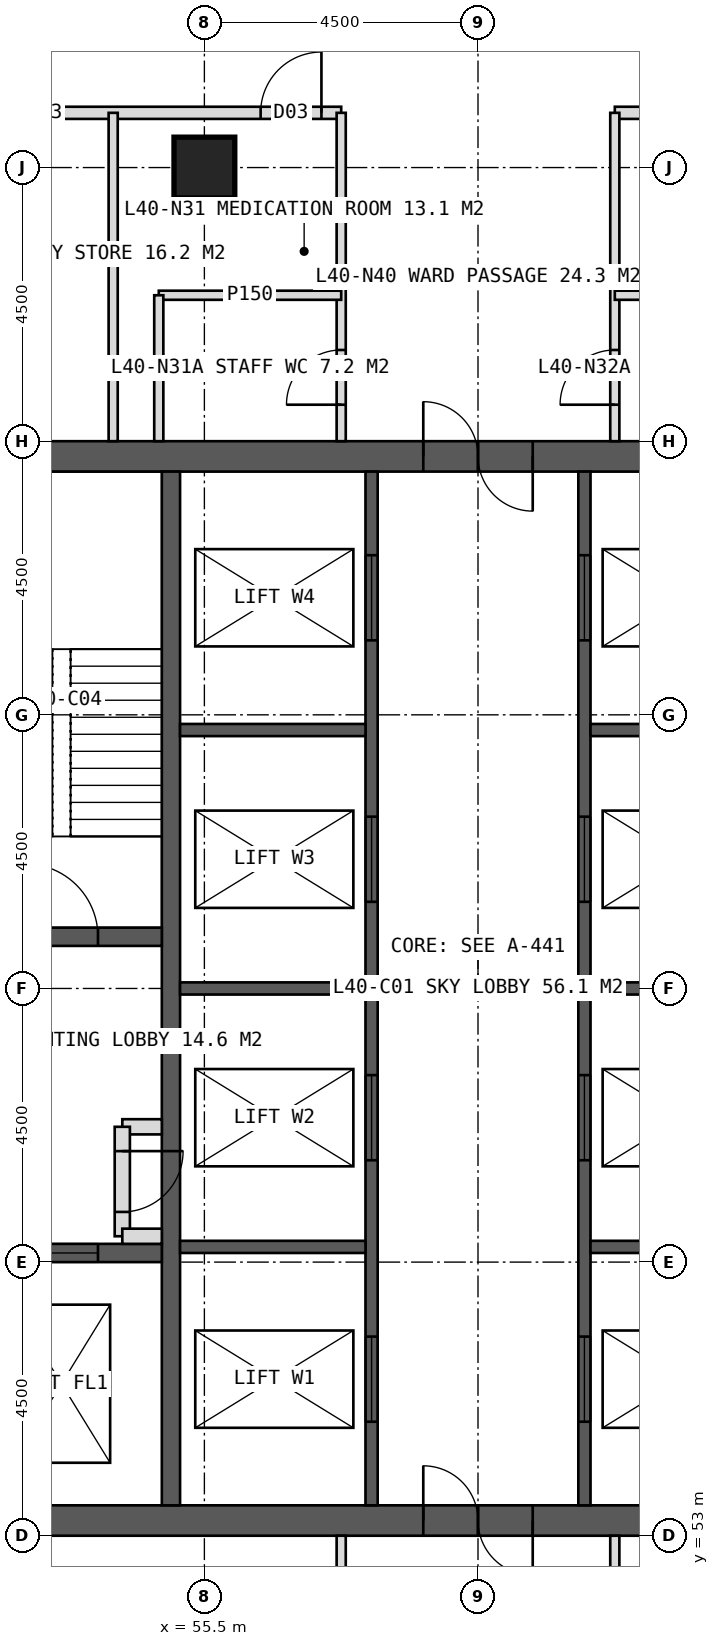
"""IFC4 building model, lengths in metres.
Left out: names, types, materials, properties, quantities, classifications, styles, units other than length and angle.
Written with IfcOpenShell. Run it as: python <this file> out.ifc"""

import sys

from ifc_helpers import new_model, si_unit, direction, frame, frame_2d, origin, origin_2d, place, context, subcontext, project, spatial, rectangle, hollow_rectangle, extrude, element, fill, save


model = new_model("IFC4")
c1 = context("Model", 3, precision=1e-05, world=origin(), true_north=direction((0.0, 1.0)))
c2 = subcontext(c1, "Body", "Model", "MODEL_VIEW")
j1 = project(units=[si_unit("LENGTHUNIT", "METRE"), si_unit("PLANEANGLEUNIT", "RADIAN")], contexts=[c1])
p1 = place(None, origin())
s1 = spatial("IfcSite", under=j1, at=p1, CompositionType="ELEMENT")
p2 = place(p1, origin())
s2 = spatial("IfcBuilding", under=s1, at=p2, CompositionType="ELEMENT")
p3 = place(p2, frame((0.0, 0.0, 168.0)))
s3 = spatial("IfcBuildingStorey", under=s2, at=p3, CompositionType="ELEMENT", Elevation=168.0)
p4 = place(p3, frame((51.0, 70.75, 0.0), z_axis=(0.0, 0.0, 1.0), x_axis=(1.0, 0.0, 0.0)))
e1 = element("IfcWall", 1, at=p4, inside=s3, PredefinedType="SHEAR", context=c2, shape_type="SweptSolid", body=[
    extrude(rectangle(XDim=18.0, YDim=0.5, at=frame_2d((9.0, 0.0))), origin(), (0.0, 0.0, 1.0), 4.0),
])
p5 = place(p4, frame((8.1, 0.0, 0.0)))
e2 = element("IfcOpeningElement", 2, at=p5, cuts=e1, PredefinedType="OPENING", context=c2, shape_type="SweptSolid", body=[
    extrude(rectangle(XDim=1.8, YDim=2.2, at=frame_2d((0.9, 1.1))), frame((0.0, 0.26, 0.0), z_axis=(0.0, -1.0, 0.0), x_axis=(1.0, 0.0, 0.0)), (0.0, 0.0, 1.0), 0.52),
])
p6 = place(p3, frame((51.0, 53.25, 0.0), z_axis=(0.0, 0.0, 1.0), x_axis=(1.0, 0.0, 0.0)))
e3 = element("IfcWall", 3, at=p6, inside=s3, PredefinedType="SHEAR", context=c2, shape_type="SweptSolid", body=[
    extrude(rectangle(XDim=18.0, YDim=0.5, at=frame_2d((9.0, 0.0))), origin(), (0.0, 0.0, 1.0), 4.0),
])
p7 = place(p6, frame((8.1, 0.0, 0.0)))
e4 = element("IfcOpeningElement", 4, at=p7, cuts=e3, PredefinedType="OPENING", context=c2, shape_type="SweptSolid", body=[
    extrude(rectangle(XDim=1.8, YDim=2.2, at=frame_2d((0.9, 1.1))), frame((0.0, 0.26, 0.0), z_axis=(0.0, -1.0, 0.0), x_axis=(1.0, 0.0, 0.0)), (0.0, 0.0, 1.0), 0.52),
])
p8 = place(p3, frame((54.95, 53.5, 0.0), z_axis=(0.0, 0.0, 1.0), x_axis=(0.0, 1.0, 0.0)))
e5 = element("IfcWall", 5, at=p8, inside=s3, PredefinedType="SHEAR", context=c2, shape_type="SweptSolid", body=[
    extrude(rectangle(XDim=17.0, YDim=0.3, at=frame_2d((8.5, 0.0))), origin(), (0.0, 0.0, 1.0), 4.0),
])
p9 = place(p3, frame((58.25, 53.5, 0.0), z_axis=(0.0, 0.0, 1.0), x_axis=(0.0, 1.0, 0.0)))
e6 = element("IfcWall", 6, at=p9, inside=s3, PredefinedType="SHEAR", context=c2, shape_type="SweptSolid", body=[
    extrude(rectangle(XDim=17.0, YDim=0.2, at=frame_2d((8.5, 0.0))), origin(), (0.0, 0.0, 1.0), 4.0),
])
p10 = place(p9, frame((1.375, 0.0, 0.0)))
e7 = element("IfcOpeningElement", 7, at=p10, cuts=e6, PredefinedType="OPENING", context=c2, shape_type="SweptSolid", body=[
    extrude(rectangle(XDim=1.4, YDim=2.2, at=frame_2d((0.7, 1.1))), frame((0.0, 0.11, 0.0), z_axis=(0.0, -1.0, 0.0), x_axis=(1.0, 0.0, 0.0)), (0.0, 0.0, 1.0), 0.22),
])
p11 = place(p9, frame((5.675, 0.0, 0.0)))
e8 = element("IfcOpeningElement", 8, at=p11, cuts=e6, PredefinedType="OPENING", context=c2, shape_type="SweptSolid", body=[
    extrude(rectangle(XDim=1.4, YDim=2.2, at=frame_2d((0.7, 1.1))), frame((0.0, 0.11, 0.0), z_axis=(0.0, -1.0, 0.0), x_axis=(1.0, 0.0, 0.0)), (0.0, 0.0, 1.0), 0.22),
])
p12 = place(p9, frame((9.925, 0.0, 0.0)))
e9 = element("IfcOpeningElement", 9, at=p12, cuts=e6, PredefinedType="OPENING", context=c2, shape_type="SweptSolid", body=[
    extrude(rectangle(XDim=1.4, YDim=2.2, at=frame_2d((0.7, 1.1))), frame((0.0, 0.11, 0.0), z_axis=(0.0, -1.0, 0.0), x_axis=(1.0, 0.0, 0.0)), (0.0, 0.0, 1.0), 0.22),
])
p13 = place(p9, frame((14.225, 0.0, 0.0)))
e10 = element("IfcOpeningElement", 10, at=p13, cuts=e6, PredefinedType="OPENING", context=c2, shape_type="SweptSolid", body=[
    extrude(rectangle(XDim=1.4, YDim=2.2, at=frame_2d((0.7, 1.1))), frame((0.0, 0.11, 0.0), z_axis=(0.0, -1.0, 0.0), x_axis=(1.0, 0.0, 0.0)), (0.0, 0.0, 1.0), 0.22),
])
p14 = place(p3, frame((61.75, 53.5, 0.0), z_axis=(0.0, 0.0, 1.0), x_axis=(0.0, 1.0, 0.0)))
e11 = element("IfcWall", 11, at=p14, inside=s3, PredefinedType="SHEAR", context=c2, shape_type="SweptSolid", body=[
    extrude(rectangle(XDim=17.0, YDim=0.2, at=frame_2d((8.5, 0.0))), origin(), (0.0, 0.0, 1.0), 4.0),
])
p15 = place(p14, frame((1.375, 0.0, 0.0)))
e12 = element("IfcOpeningElement", 12, at=p15, cuts=e11, PredefinedType="OPENING", context=c2, shape_type="SweptSolid", body=[
    extrude(rectangle(XDim=1.4, YDim=2.2, at=frame_2d((0.7, 1.1))), frame((0.0, 0.11, 0.0), z_axis=(0.0, -1.0, 0.0), x_axis=(1.0, 0.0, 0.0)), (0.0, 0.0, 1.0), 0.22),
])
p16 = place(p14, frame((5.675, 0.0, 0.0)))
e13 = element("IfcOpeningElement", 13, at=p16, cuts=e11, PredefinedType="OPENING", context=c2, shape_type="SweptSolid", body=[
    extrude(rectangle(XDim=1.4, YDim=2.2, at=frame_2d((0.7, 1.1))), frame((0.0, 0.11, 0.0), z_axis=(0.0, -1.0, 0.0), x_axis=(1.0, 0.0, 0.0)), (0.0, 0.0, 1.0), 0.22),
])
p17 = place(p14, frame((9.925, 0.0, 0.0)))
e14 = element("IfcOpeningElement", 14, at=p17, cuts=e11, PredefinedType="OPENING", context=c2, shape_type="SweptSolid", body=[
    extrude(rectangle(XDim=1.4, YDim=2.2, at=frame_2d((0.7, 1.1))), frame((0.0, 0.11, 0.0), z_axis=(0.0, -1.0, 0.0), x_axis=(1.0, 0.0, 0.0)), (0.0, 0.0, 1.0), 0.22),
])
p18 = place(p14, frame((14.225, 0.0, 0.0)))
e15 = element("IfcOpeningElement", 15, at=p18, cuts=e11, PredefinedType="OPENING", context=c2, shape_type="SweptSolid", body=[
    extrude(rectangle(XDim=1.4, YDim=2.2, at=frame_2d((0.7, 1.1))), frame((0.0, 0.11, 0.0), z_axis=(0.0, -1.0, 0.0), x_axis=(1.0, 0.0, 0.0)), (0.0, 0.0, 1.0), 0.22),
])
for number, where, z_axis, x_axis in (
    (16, (55.1, 57.75, 0.0), (0.0, 0.0, 1.0), (1.0, 0.0, 0.0)),
    (17, (61.85, 57.75, 0.0), (0.0, 0.0, 1.0), (1.0, 0.0, 0.0)),
    (18, (55.1, 62.0, 0.0), (0.0, 0.0, 1.0), (1.0, 0.0, 0.0)),
    (19, (61.85, 62.0, 0.0), (0.0, 0.0, 1.0), (1.0, 0.0, 0.0)),
    (20, (55.1, 66.25, 0.0), (0.0, 0.0, 1.0), (1.0, 0.0, 0.0)),
    (21, (61.85, 66.25, 0.0), (0.0, 0.0, 1.0), (1.0, 0.0, 0.0)),
):
    element("IfcWall", number, at=place(p3, frame(where, z_axis=z_axis, x_axis=x_axis)), inside=s3, PredefinedType="SHEAR", context=c2, shape_type="SweptSolid", body=[
        extrude(rectangle(XDim=3.05, YDim=0.2, at=frame_2d((1.525, 0.0))), origin(), (0.0, 0.0, 1.0), 4.0),
    ])
p19 = place(p3, frame((51.5, 62.85, 0.0), z_axis=(0.0, 0.0, 1.0), x_axis=(1.0, 0.0, 0.0)))
e22 = element("IfcWall", 22, at=p19, inside=s3, PredefinedType="SHEAR", context=c2, shape_type="SweptSolid", body=[
    extrude(rectangle(XDim=3.3, YDim=0.3, at=frame_2d((1.65, 0.0))), origin(), (0.0, 0.0, 1.0), 4.0),
])
p20 = place(p19, frame((1.05, 0.0, 0.0)))
e23 = element("IfcOpeningElement", 23, at=p20, cuts=e22, PredefinedType="OPENING", context=c2, shape_type="SweptSolid", body=[
    extrude(rectangle(XDim=1.2, YDim=2.1, at=frame_2d((0.6, 1.05))), frame((0.0, 0.16, 0.0), z_axis=(0.0, -1.0, 0.0), x_axis=(1.0, 0.0, 0.0)), (0.0, 0.0, 1.0), 0.32),
])
p21 = place(p3, frame((51.5, 57.65, 0.0), z_axis=(0.0, 0.0, 1.0), x_axis=(1.0, 0.0, 0.0)))
e24 = element("IfcWall", 24, at=p21, inside=s3, PredefinedType="SHEAR", context=c2, shape_type="SweptSolid", body=[
    extrude(rectangle(XDim=3.3, YDim=0.3, at=frame_2d((1.65, 0.0))), origin(), (0.0, 0.0, 1.0), 4.0),
])
p22 = place(p21, frame((1.05, 0.0, 0.0)))
e25 = element("IfcOpeningElement", 25, at=p22, cuts=e24, PredefinedType="OPENING", context=c2, shape_type="SweptSolid", body=[
    extrude(rectangle(XDim=1.2, YDim=2.2, at=frame_2d((0.6, 1.1))), frame((0.0, 0.16, 0.0), z_axis=(0.0, -1.0, 0.0), x_axis=(1.0, 0.0, 0.0)), (0.0, 0.0, 1.0), 0.32),
])
p23 = place(p3, frame((55.5, 75.5, 0.0), z_axis=(0.0, 0.0, 1.0), x_axis=(1.0, 0.0, 0.0)))
e26 = element("IfcColumn", 26, at=p23, inside=s3, PredefinedType="COLUMN", context=c2, shape_type="SweptSolid", body=[
    extrude(hollow_rectangle(XDim=1.0, YDim=1.0, WallThickness=0.1, at=origin_2d()), origin(), (0.0, 0.0, 1.0), 4.0),
])
p24 = place(p3, frame((45.6, 76.4, 0.0), z_axis=(0.0, 0.0, 1.0), x_axis=(1.0, 0.0, 0.0)))
e27 = element("IfcWall", 27, at=p24, inside=s3, PredefinedType="PARTITIONING", context=c2, shape_type="SweptSolid", body=[
    extrude(rectangle(XDim=12.15, YDim=0.2, at=frame_2d((6.075, 0.0))), origin(), (0.0, 0.0, 1.0), 3.75),
])
p25 = place(p24, frame((6.4, 0.0, 0.0)))
e28 = element("IfcOpeningElement", 28, at=p25, cuts=e27, PredefinedType="OPENING", context=c2, shape_type="SweptSolid", body=[
    extrude(rectangle(XDim=1.0, YDim=2.1, at=frame_2d((0.5, 1.05))), frame((0.0, 0.11, 0.0), z_axis=(0.0, -1.0, 0.0), x_axis=(1.0, 0.0, 0.0)), (0.0, 0.0, 1.0), 0.22),
])
p26 = place(p24, frame((10.825, 0.0, 0.0)))
e29 = element("IfcOpeningElement", 29, at=p26, cuts=e27, PredefinedType="OPENING", context=c2, shape_type="SweptSolid", body=[
    extrude(rectangle(XDim=1.0, YDim=2.1, at=frame_2d((0.5, 1.05))), frame((0.0, 0.11, 0.0), z_axis=(0.0, -1.0, 0.0), x_axis=(1.0, 0.0, 0.0)), (0.0, 0.0, 1.0), 0.22),
])
p27 = place(p3, frame((62.25, 76.4, 0.0), z_axis=(0.0, 0.0, 1.0), x_axis=(1.0, 0.0, 0.0)))
e30 = element("IfcWall", 30, at=p27, inside=s3, PredefinedType="PARTITIONING", context=c2, shape_type="SweptSolid", body=[
    extrude(rectangle(XDim=6.75, YDim=0.2, at=frame_2d((3.375, 0.0))), origin(), (0.0, 0.0, 1.0), 3.75),
])
p28 = place(p27, frame((4.3, 0.0, 0.0)))
e31 = element("IfcOpeningElement", 31, at=p28, cuts=e30, PredefinedType="OPENING", context=c2, shape_type="SweptSolid", body=[
    extrude(rectangle(XDim=1.0, YDim=2.1, at=frame_2d((0.5, 1.05))), frame((0.0, 0.11, 0.0), z_axis=(0.0, -1.0, 0.0), x_axis=(1.0, 0.0, 0.0)), (0.0, 0.0, 1.0), 0.22),
])
p29 = place(p3, frame((57.75, 71.0, 0.0), z_axis=(0.0, 0.0, 1.0), x_axis=(0.0, 1.0, 0.0)))
e32 = element("IfcWall", 32, at=p29, inside=s3, PredefinedType="PARTITIONING", context=c2, shape_type="SweptSolid", body=[
    extrude(rectangle(XDim=5.4, YDim=0.15, at=frame_2d((2.7, 0.0))), origin(), (0.0, 0.0, 1.0), 3.75),
])
p30 = place(p29, frame((0.6, 0.0, 0.0)))
e33 = element("IfcOpeningElement", 33, at=p30, cuts=e32, PredefinedType="OPENING", context=c2, shape_type="SweptSolid", body=[
    extrude(rectangle(XDim=0.9, YDim=2.1, at=frame_2d((0.45, 1.05))), frame((0.0, 0.085, 0.0), z_axis=(0.0, -1.0, 0.0), x_axis=(1.0, 0.0, 0.0)), (0.0, 0.0, 1.0), 0.17),
])
p31 = place(p3, frame((62.25, 71.0, 0.0), z_axis=(0.0, 0.0, 1.0), x_axis=(0.0, 1.0, 0.0)))
e34 = element("IfcWall", 34, at=p31, inside=s3, PredefinedType="PARTITIONING", context=c2, shape_type="SweptSolid", body=[
    extrude(rectangle(XDim=5.4, YDim=0.15, at=frame_2d((2.7, 0.0))), origin(), (0.0, 0.0, 1.0), 3.75),
])
p32 = place(p31, frame((0.6, 0.0, 0.0)))
e35 = element("IfcOpeningElement", 35, at=p32, cuts=e34, PredefinedType="OPENING", context=c2, shape_type="SweptSolid", body=[
    extrude(rectangle(XDim=0.9, YDim=2.1, at=frame_2d((0.45, 1.05))), frame((0.0, 0.085, 0.0), z_axis=(0.0, -1.0, 0.0), x_axis=(1.0, 0.0, 0.0)), (0.0, 0.0, 1.0), 0.17),
])
p33 = place(p3, frame((54.0, 71.0, 0.0), z_axis=(0.0, 0.0, 1.0), x_axis=(0.0, 1.0, 0.0)))
e36 = element("IfcWall", 36, at=p33, inside=s3, PredefinedType="PARTITIONING", context=c2, shape_type="SweptSolid", body=[
    extrude(rectangle(XDim=5.4, YDim=0.15, at=frame_2d((2.7, 0.0))), origin(), (0.0, 0.0, 1.0), 3.75),
])
p34 = place(p3, frame((54.75, 73.4, 0.0), z_axis=(0.0, 0.0, 1.0), x_axis=(1.0, 0.0, 0.0)))
e37 = element("IfcWall", 37, at=p34, inside=s3, PredefinedType="PARTITIONING", context=c2, shape_type="SweptSolid", body=[
    extrude(rectangle(XDim=3.0, YDim=0.15, at=frame_2d((1.5, 0.0))), origin(), (0.0, 0.0, 1.0), 3.75),
])
p35 = place(p3, frame((54.75, 71.0, 0.0), z_axis=(0.0, 0.0, 1.0), x_axis=(0.0, 1.0, 0.0)))
e38 = element("IfcWall", 38, at=p35, inside=s3, PredefinedType="PARTITIONING", context=c2, shape_type="SweptSolid", body=[
    extrude(rectangle(XDim=2.4, YDim=0.15, at=frame_2d((1.2, 0.0))), origin(), (0.0, 0.0, 1.0), 3.75),
])
p36 = place(p3, frame((62.25, 73.4, 0.0), z_axis=(0.0, 0.0, 1.0), x_axis=(1.0, 0.0, 0.0)))
e39 = element("IfcWall", 39, at=p36, inside=s3, PredefinedType="PARTITIONING", context=c2, shape_type="SweptSolid", body=[
    extrude(rectangle(XDim=3.0, YDim=0.15, at=frame_2d((1.5, 0.0))), origin(), (0.0, 0.0, 1.0), 3.75),
])
for number, where, z_axis, x_axis in (
    (40, (62.25, 53.0, 0.0), (0.0, 0.0, 1.0), (0.0, -1.0, 0.0)),
    (41, (57.75, 53.0, 0.0), (0.0, 0.0, 1.0), (0.0, -1.0, 0.0)),
):
    element("IfcWall", number, at=place(p3, frame(where, z_axis=z_axis, x_axis=x_axis)), inside=s3, PredefinedType="PARTITIONING", context=c2, shape_type="SweptSolid", body=[
        extrude(rectangle(XDim=5.4, YDim=0.15, at=frame_2d((2.7, 0.0))), origin(), (0.0, 0.0, 1.0), 3.75),
    ])
p37 = place(p3, frame((54.8, 59.725, 0.0), z_axis=(0.0, 0.0, 1.0), x_axis=(-1.0, 0.0, 0.0)))
e42 = element("IfcWall", 42, at=p37, inside=s3, PredefinedType="SOLIDWALL", context=c2, shape_type="SweptSolid", body=[
    extrude(rectangle(XDim=0.65, YDim=0.25, at=frame_2d((0.325, 0.0))), origin(), (0.0, 0.0, 1.0), 3.75),
])
p38 = place(p3, frame((54.15, 59.725, 0.0), z_axis=(0.0, 0.0, 1.0), x_axis=(0.0, -1.0, 0.0)))
e43 = element("IfcWall", 43, at=p38, inside=s3, PredefinedType="SOLIDWALL", context=c2, shape_type="SweptSolid", body=[
    extrude(rectangle(XDim=1.8, YDim=0.25, at=frame_2d((0.9, 0.0))), origin(), (0.0, 0.0, 1.0), 3.75),
])
p39 = place(p38, frame((0.4, 0.0, 0.0)))
e44 = element("IfcOpeningElement", 44, at=p39, cuts=e43, PredefinedType="OPENING", context=c2, shape_type="SweptSolid", body=[
    extrude(rectangle(XDim=1.0, YDim=2.1, at=frame_2d((0.5, 1.05))), frame((0.0, 0.135, 0.0), z_axis=(0.0, -1.0, 0.0), x_axis=(1.0, 0.0, 0.0)), (0.0, 0.0, 1.0), 0.27),
])
p40 = place(p3, frame((54.15, 57.925, 0.0), z_axis=(0.0, 0.0, 1.0), x_axis=(1.0, 0.0, 0.0)))
e45 = element("IfcWall", 45, at=p40, inside=s3, PredefinedType="SOLIDWALL", context=c2, shape_type="SweptSolid", body=[
    extrude(rectangle(XDim=0.65, YDim=0.25, at=frame_2d((0.325, 0.0))), origin(), (0.0, 0.0, 1.0), 3.75),
])
p41 = place(p30, origin())
e46 = element("IfcDoor", 46, at=p41, inside=s3, OperationType="SINGLE_SWING_LEFT", PredefinedType="DOOR", context=c2, shape_type="SweptSolid", body=[
    extrude(rectangle(XDim=0.9, YDim=2.1, at=frame_2d((0.45, 1.05))), frame((0.0, 0.025, 0.0), z_axis=(0.0, -1.0, 0.0), x_axis=(1.0, 0.0, 0.0)), (0.0, 0.0, 1.0), 0.05),
])
fill(e33, e46)
p42 = place(p26, origin())
e47 = element("IfcDoor", 47, at=p42, inside=s3, OperationType="SINGLE_SWING_RIGHT", PredefinedType="DOOR", context=c2, shape_type="SweptSolid", body=[
    extrude(rectangle(XDim=1.0, YDim=2.1, at=frame_2d((0.5, 1.05))), frame((0.0, 0.025, 0.0), z_axis=(0.0, -1.0, 0.0), x_axis=(1.0, 0.0, 0.0)), (0.0, 0.0, 1.0), 0.05),
])
fill(e29, e47)
p43 = place(p32, origin())
e48 = element("IfcDoor", 48, at=p43, inside=s3, OperationType="SINGLE_SWING_LEFT", PredefinedType="DOOR", context=c2, shape_type="SweptSolid", body=[
    extrude(rectangle(XDim=0.9, YDim=2.1, at=frame_2d((0.45, 1.05))), frame((0.0, 0.025, 0.0), z_axis=(0.0, -1.0, 0.0), x_axis=(1.0, 0.0, 0.0)), (0.0, 0.0, 1.0), 0.05),
])
fill(e35, e48)
p44 = place(p5, origin())
e49 = element("IfcDoor", 49, at=p44, inside=s3, OperationType="DOUBLE_DOOR_SINGLE_SWING", PredefinedType="DOOR", context=c2, shape_type="SweptSolid", body=[
    extrude(rectangle(XDim=1.8, YDim=2.2, at=frame_2d((0.9, 1.1))), frame((0.0, 0.025, 0.0), z_axis=(0.0, -1.0, 0.0), x_axis=(1.0, 0.0, 0.0)), (0.0, 0.0, 1.0), 0.05),
])
fill(e2, e49)
p45 = place(p7, origin())
e50 = element("IfcDoor", 50, at=p45, inside=s3, OperationType="DOUBLE_DOOR_SINGLE_SWING", PredefinedType="DOOR", context=c2, shape_type="SweptSolid", body=[
    extrude(rectangle(XDim=1.8, YDim=2.2, at=frame_2d((0.9, 1.1))), frame((0.0, 0.025, 0.0), z_axis=(0.0, -1.0, 0.0), x_axis=(1.0, 0.0, 0.0)), (0.0, 0.0, 1.0), 0.05),
])
fill(e4, e50)
p46 = place(p20, origin())
e51 = element("IfcDoor", 51, at=p46, inside=s3, OperationType="SINGLE_SWING_LEFT", PredefinedType="DOOR", context=c2, shape_type="SweptSolid", body=[
    extrude(rectangle(XDim=1.2, YDim=2.1, at=frame_2d((0.6, 1.05))), frame((0.0, 0.025, 0.0), z_axis=(0.0, -1.0, 0.0), x_axis=(1.0, 0.0, 0.0)), (0.0, 0.0, 1.0), 0.05),
])
fill(e23, e51)
p47 = place(p22, origin())
e52 = element("IfcDoor", 52, at=p47, inside=s3, OperationType="SLIDING_TO_LEFT", PredefinedType="DOOR", context=c2, shape_type="SweptSolid", body=[
    extrude(rectangle(XDim=1.2, YDim=2.2, at=frame_2d((0.6, 1.1))), frame((0.0, 0.025, 0.0), z_axis=(0.0, -1.0, 0.0), x_axis=(1.0, 0.0, 0.0)), (0.0, 0.0, 1.0), 0.05),
])
fill(e25, e52)
p48 = place(p10, origin())
e53 = element("IfcDoor", 53, at=p48, inside=s3, OperationType="SLIDING_TO_LEFT", PredefinedType="DOOR", context=c2, shape_type="SweptSolid", body=[
    extrude(rectangle(XDim=1.4, YDim=2.2, at=frame_2d((0.7, 1.1))), frame((0.0, 0.025, 0.0), z_axis=(0.0, -1.0, 0.0), x_axis=(1.0, 0.0, 0.0)), (0.0, 0.0, 1.0), 0.05),
])
fill(e7, e53)
p49 = place(p15, origin())
e54 = element("IfcDoor", 54, at=p49, inside=s3, OperationType="SLIDING_TO_LEFT", PredefinedType="DOOR", context=c2, shape_type="SweptSolid", body=[
    extrude(rectangle(XDim=1.4, YDim=2.2, at=frame_2d((0.7, 1.1))), frame((0.0, 0.025, 0.0), z_axis=(0.0, -1.0, 0.0), x_axis=(1.0, 0.0, 0.0)), (0.0, 0.0, 1.0), 0.05),
])
fill(e12, e54)
p50 = place(p11, origin())
e55 = element("IfcDoor", 55, at=p50, inside=s3, OperationType="SLIDING_TO_LEFT", PredefinedType="DOOR", context=c2, shape_type="SweptSolid", body=[
    extrude(rectangle(XDim=1.4, YDim=2.2, at=frame_2d((0.7, 1.1))), frame((0.0, 0.025, 0.0), z_axis=(0.0, -1.0, 0.0), x_axis=(1.0, 0.0, 0.0)), (0.0, 0.0, 1.0), 0.05),
])
fill(e8, e55)
p51 = place(p16, origin())
e56 = element("IfcDoor", 56, at=p51, inside=s3, OperationType="SLIDING_TO_LEFT", PredefinedType="DOOR", context=c2, shape_type="SweptSolid", body=[
    extrude(rectangle(XDim=1.4, YDim=2.2, at=frame_2d((0.7, 1.1))), frame((0.0, 0.025, 0.0), z_axis=(0.0, -1.0, 0.0), x_axis=(1.0, 0.0, 0.0)), (0.0, 0.0, 1.0), 0.05),
])
fill(e13, e56)
p52 = place(p12, origin())
e57 = element("IfcDoor", 57, at=p52, inside=s3, OperationType="SLIDING_TO_LEFT", PredefinedType="DOOR", context=c2, shape_type="SweptSolid", body=[
    extrude(rectangle(XDim=1.4, YDim=2.2, at=frame_2d((0.7, 1.1))), frame((0.0, 0.025, 0.0), z_axis=(0.0, -1.0, 0.0), x_axis=(1.0, 0.0, 0.0)), (0.0, 0.0, 1.0), 0.05),
])
fill(e9, e57)
p53 = place(p17, origin())
e58 = element("IfcDoor", 58, at=p53, inside=s3, OperationType="SLIDING_TO_LEFT", PredefinedType="DOOR", context=c2, shape_type="SweptSolid", body=[
    extrude(rectangle(XDim=1.4, YDim=2.2, at=frame_2d((0.7, 1.1))), frame((0.0, 0.025, 0.0), z_axis=(0.0, -1.0, 0.0), x_axis=(1.0, 0.0, 0.0)), (0.0, 0.0, 1.0), 0.05),
])
fill(e14, e58)
p54 = place(p13, origin())
e59 = element("IfcDoor", 59, at=p54, inside=s3, OperationType="SLIDING_TO_LEFT", PredefinedType="DOOR", context=c2, shape_type="SweptSolid", body=[
    extrude(rectangle(XDim=1.4, YDim=2.2, at=frame_2d((0.7, 1.1))), frame((0.0, 0.025, 0.0), z_axis=(0.0, -1.0, 0.0), x_axis=(1.0, 0.0, 0.0)), (0.0, 0.0, 1.0), 0.05),
])
fill(e10, e59)
p55 = place(p18, origin())
e60 = element("IfcDoor", 60, at=p55, inside=s3, OperationType="SLIDING_TO_LEFT", PredefinedType="DOOR", context=c2, shape_type="SweptSolid", body=[
    extrude(rectangle(XDim=1.4, YDim=2.2, at=frame_2d((0.7, 1.1))), frame((0.0, 0.025, 0.0), z_axis=(0.0, -1.0, 0.0), x_axis=(1.0, 0.0, 0.0)), (0.0, 0.0, 1.0), 0.05),
])
fill(e15, e60)
p56 = place(p39, origin())
e61 = element("IfcDoor", 61, at=p56, inside=s3, OperationType="SINGLE_SWING_LEFT", PredefinedType="DOOR", context=c2, shape_type="SweptSolid", body=[
    extrude(rectangle(XDim=1.0, YDim=2.1, at=frame_2d((0.5, 1.05))), frame((0.0, 0.025, 0.0), z_axis=(0.0, -1.0, 0.0), x_axis=(1.0, 0.0, 0.0)), (0.0, 0.0, 1.0), 0.05),
])
fill(e44, e61)
save(model, sys.argv[1])
